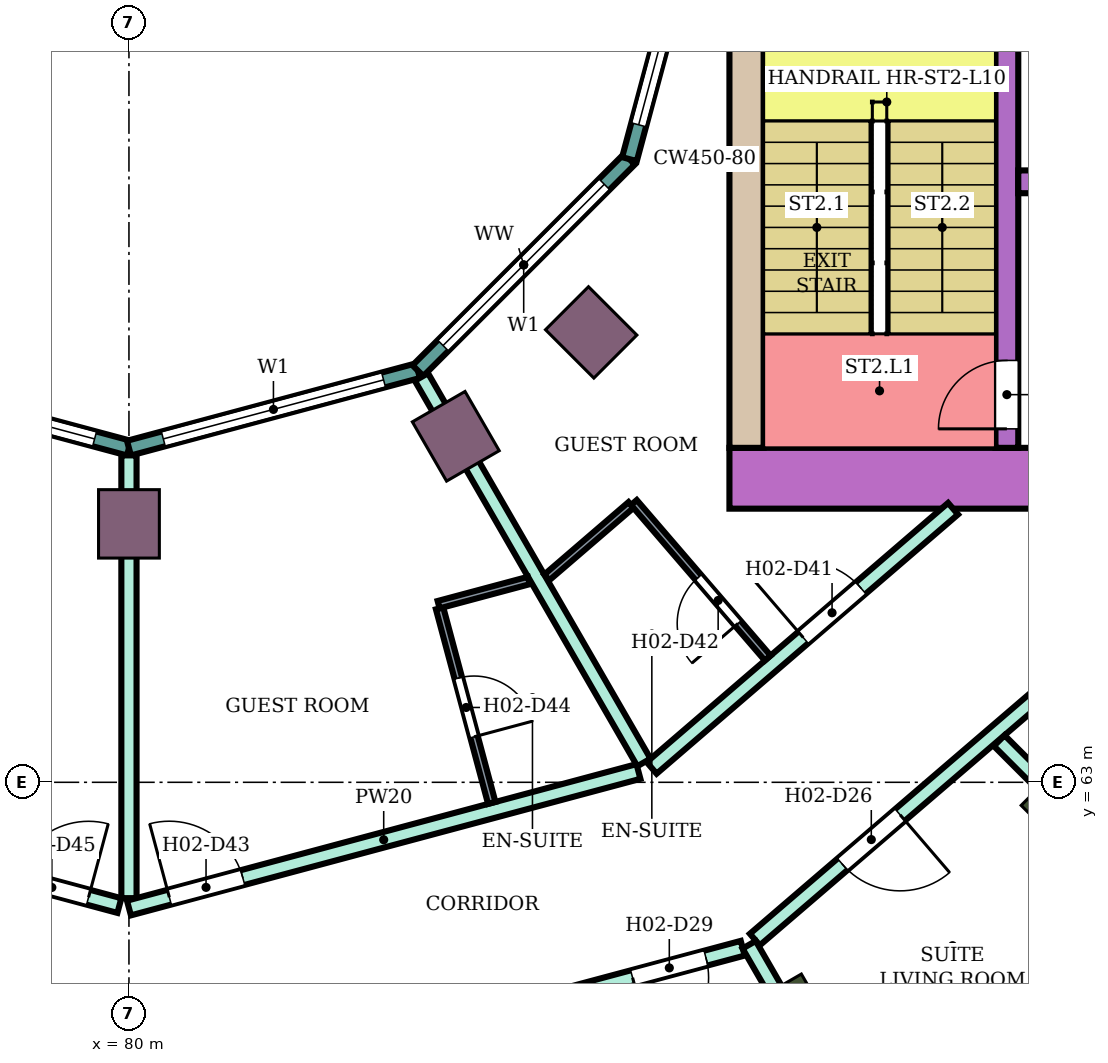
"""IFC4 building model, lengths in metres.
Left out: names, types, materials, properties, quantities, classifications, styles, units other than length and angle.
Written with IfcOpenShell. Run it as: python <this file> out.ifc"""

import sys

from ifc_helpers import new_model, si_unit, direction, frame, frame_2d, origin, origin_2d, place, context, subcontext, project, spatial, rectangle, extrude, element, fill, save


model = new_model("IFC4")
c1 = context("Model", 3, precision=1e-05, world=origin(), true_north=direction((0.0, 1.0)))
c2 = subcontext(c1, "Body", "Model", "MODEL_VIEW")
j1 = project(units=[si_unit("LENGTHUNIT", "METRE"), si_unit("PLANEANGLEUNIT", "RADIAN")], contexts=[c1])
p1 = place(None, origin())
s1 = spatial("IfcSite", under=j1, at=p1, CompositionType="ELEMENT")
p2 = place(p1, origin())
s2 = spatial("IfcBuilding", under=s1, at=p2, CompositionType="ELEMENT")
p3 = place(p2, frame((0.0, 0.0, 47.8)))
s3 = spatial("IfcBuildingStorey", under=s2, at=p3, CompositionType="ELEMENT", Elevation=47.8)
for number, where, z_axis, x_axis in (
    (1, (88.8, 59.758, 0.0), (0.0, 0.0, 1.0), (0.5, -0.866, 0.0)),
    (2, (92.445, 62.555, 0.0), (0.0, 0.0, 1.0), (0.707, -0.707, 0.0)),
):
    element("IfcColumn", number, at=place(p3, frame(where, z_axis=z_axis, x_axis=x_axis)), inside=s3, PredefinedType="COLUMN", context=c2, shape_type="SweptSolid", body=[
        extrude(rectangle(XDim=1.2, YDim=0.8, at=origin_2d()), origin(), (0.0, 0.0, 1.0), 3.8),
    ])
for number, where, z_axis, x_axis in (
    (3, (80.0, 66.4, 0.0), (0.0, 0.0, 1.0), (0.0, -1.0, 0.0)),
    (4, (84.3, 67.552, 0.0), (0.0, 0.0, 1.0), (0.5, -0.866, 0.0)),
    (5, (86.081, 68.919, 0.0), (0.0, 0.0, 1.0), (0.707, -0.707, 0.0)),
):
    element("IfcColumn", number, at=place(p3, frame(where, z_axis=z_axis, x_axis=x_axis)), inside=s3, PredefinedType="COLUMN", context=c2, shape_type="SweptSolid", body=[
        extrude(rectangle(XDim=0.9, YDim=0.8, at=origin_2d()), origin(), (0.0, 0.0, 1.0), 3.8),
    ])
p4 = place(p3, frame((87.9, 67.0, 0.0), z_axis=(0.0, 0.0, 1.0), x_axis=(1.0, 0.0, 0.0)))
e6 = element("IfcWall", 6, at=p4, inside=s3, PredefinedType="SHEAR", context=c2, shape_type="SweptSolid", body=[
    extrude(rectangle(XDim=14.7, YDim=0.8, at=frame_2d((7.35, 0.0))), origin(), (0.0, 0.0, 1.0), 3.48),
])
p5 = place(p4, frame((4.2, 0.0, 0.0)))
e7 = element("IfcOpeningElement", 7, at=p5, cuts=e6, PredefinedType="OPENING", context=c2, shape_type="SweptSolid", body=[
    extrude(rectangle(XDim=2.4, YDim=2.4, at=frame_2d((1.2, 1.2))), frame((0.0, 0.41, 0.0), z_axis=(0.0, -1.0, 0.0), x_axis=(1.0, 0.0, 0.0)), (0.0, 0.0, 1.0), 0.82),
])
p6 = place(p3, frame((88.125, 67.4, 0.0), z_axis=(0.0, 0.0, 1.0), x_axis=(0.0, 1.0, 0.0)))
e8 = element("IfcWall", 8, at=p6, inside=s3, PredefinedType="SHEAR", context=c2, shape_type="SweptSolid", body=[
    extrude(rectangle(XDim=7.6, YDim=0.45, at=frame_2d((3.8, 0.0))), origin(), (0.0, 0.0, 1.0), 3.48),
])
p7 = place(p3, frame((91.55, 67.4, 0.0), z_axis=(0.0, 0.0, 1.0), x_axis=(0.0, 1.0, 0.0)))
e9 = element("IfcWall", 9, at=p7, inside=s3, PredefinedType="SHEAR", context=c2, shape_type="SweptSolid", body=[
    extrude(rectangle(XDim=7.6, YDim=0.3, at=frame_2d((3.8, 0.0))), origin(), (0.0, 0.0, 1.0), 3.48),
])
p8 = place(p7, frame((0.25, 0.0, 0.0)))
e10 = element("IfcOpeningElement", 10, at=p8, cuts=e9, PredefinedType="OPENING", context=c2, shape_type="SweptSolid", body=[
    extrude(rectangle(XDim=0.9, YDim=2.1, at=frame_2d((0.45, 1.05))), frame((0.0, 0.16, 0.0), z_axis=(0.0, -1.0, 0.0), x_axis=(1.0, 0.0, 0.0)), (0.0, 0.0, 1.0), 0.32),
])
p9 = place(p3, frame((91.7, 70.9, 0.0), z_axis=(0.0, 0.0, 1.0), x_axis=(1.0, 0.0, 0.0)))
e11 = element("IfcWall", 11, at=p9, inside=s3, PredefinedType="SHEAR", context=c2, shape_type="SweptSolid", body=[
    extrude(rectangle(XDim=10.9, YDim=0.3, at=frame_2d((5.45, 0.0))), origin(), (0.0, 0.0, 1.0), 3.48),
])
p10 = place(p9, frame((0.4, 0.0, 0.0)))
e12 = element("IfcOpeningElement", 12, at=p10, cuts=e11, PredefinedType="OPENING", context=c2, shape_type="SweptSolid", body=[
    extrude(rectangle(XDim=1.4, YDim=2.1, at=frame_2d((0.7, 1.05))), frame((0.0, 0.16, 0.0), z_axis=(0.0, -1.0, 0.0), x_axis=(1.0, 0.0, 0.0)), (0.0, 0.0, 1.0), 0.32),
])
p11 = place(p9, frame((5.4, 0.0, 0.0)))
e13 = element("IfcOpeningElement", 13, at=p11, cuts=e11, PredefinedType="OPENING", context=c2, shape_type="SweptSolid", body=[
    extrude(rectangle(XDim=1.4, YDim=2.1, at=frame_2d((0.7, 1.05))), frame((0.0, 0.16, 0.0), z_axis=(0.0, -1.0, 0.0), x_axis=(1.0, 0.0, 0.0)), (0.0, 0.0, 1.0), 0.32),
])
p12 = place(p9, frame((8.1, 0.0, 0.0)))
e14 = element("IfcOpeningElement", 14, at=p12, cuts=e11, PredefinedType="OPENING", context=c2, shape_type="SweptSolid", body=[
    extrude(rectangle(XDim=1.0, YDim=2.1, at=frame_2d((0.5, 1.05))), frame((0.0, 0.16, 0.0), z_axis=(0.0, -1.0, 0.0), x_axis=(1.0, 0.0, 0.0)), (0.0, 0.0, 1.0), 0.32),
])
p13 = place(p3, frame((76.198, 68.415, 0.0), z_axis=(0.0, 0.0, 1.0), x_axis=(0.965933654434, -0.258789828301, 0.0)))
e15 = element("IfcWall", 15, at=p13, inside=s3, PredefinedType="NOTDEFINED", context=c2, shape_type="SweptSolid", body=[
    extrude(rectangle(XDim=3.936, YDim=0.2, at=frame_2d((1.968, 0.0))), origin(), (0.0, 0.0, 1.0), 3.8),
])
p14 = place(p13, frame((0.468, 0.0, 0.9)))
e16 = element("IfcOpeningElement", 16, at=p14, cuts=e15, PredefinedType="OPENING", context=c2, shape_type="SweptSolid", body=[
    extrude(rectangle(XDim=3.0, YDim=2.3, at=frame_2d((1.5, 1.15))), frame((0.0, 0.11, 0.0), z_axis=(0.0, -1.0, 0.0), x_axis=(1.0, 0.0, 0.0)), (0.0, 0.0, 1.0), 0.22),
])
p15 = place(p3, frame((80.0, 67.396, 0.0), z_axis=(0.0, 0.0, 1.0), x_axis=(0.965933654434, 0.258789828301, 0.0)))
e17 = element("IfcWall", 17, at=p15, inside=s3, PredefinedType="NOTDEFINED", context=c2, shape_type="SweptSolid", body=[
    extrude(rectangle(XDim=3.936, YDim=0.2, at=frame_2d((1.968, 0.0))), origin(), (0.0, 0.0, 1.0), 3.8),
])
p16 = place(p15, frame((0.468, 0.0, 0.9)))
e18 = element("IfcOpeningElement", 18, at=p16, cuts=e17, PredefinedType="OPENING", context=c2, shape_type="SweptSolid", body=[
    extrude(rectangle(XDim=3.0, YDim=2.3, at=frame_2d((1.5, 1.15))), frame((0.0, 0.11, 0.0), z_axis=(0.0, -1.0, 0.0), x_axis=(1.0, 0.0, 0.0)), (0.0, 0.0, 1.0), 0.22),
])
p17 = place(p3, frame((83.802, 68.415, 0.0), z_axis=(0.0, 0.0, 1.0), x_axis=(0.707106781187, 0.707106781187, 0.0)))
e19 = element("IfcWall", 19, at=p17, inside=s3, PredefinedType="NOTDEFINED", context=c2, shape_type="SweptSolid", body=[
    extrude(rectangle(XDim=3.936, YDim=0.2, at=frame_2d((1.968, 0.0))), origin(), (0.0, 0.0, 1.0), 3.8),
])
p18 = place(p17, frame((0.468, 0.0, 0.9)))
e20 = element("IfcOpeningElement", 20, at=p18, cuts=e19, PredefinedType="OPENING", context=c2, shape_type="SweptSolid", body=[
    extrude(rectangle(XDim=3.0, YDim=2.3, at=frame_2d((1.5, 1.15))), frame((0.0, 0.11, 0.0), z_axis=(0.0, -1.0, 0.0), x_axis=(1.0, 0.0, 0.0)), (0.0, 0.0, 1.0), 0.22),
])
p19 = place(p3, frame((86.585, 71.198, 0.0), z_axis=(0.0, 0.0, 1.0), x_axis=(0.258789828301, 0.965933654434, 0.0)))
e21 = element("IfcWall", 21, at=p19, inside=s3, PredefinedType="NOTDEFINED", context=c2, shape_type="SweptSolid", body=[
    extrude(rectangle(XDim=3.936, YDim=0.2, at=frame_2d((1.968, 0.0))), origin(), (0.0, 0.0, 1.0), 3.8),
])
p20 = place(p19, frame((0.468, 0.0, 0.9)))
e22 = element("IfcOpeningElement", 22, at=p20, cuts=e21, PredefinedType="OPENING", context=c2, shape_type="SweptSolid", body=[
    extrude(rectangle(XDim=3.0, YDim=2.3, at=frame_2d((1.5, 1.15))), frame((0.0, 0.11, 0.0), z_axis=(0.0, -1.0, 0.0), x_axis=(1.0, 0.0, 0.0)), (0.0, 0.0, 1.0), 0.22),
])
p21 = place(p3, frame((71.877, 60.832, 0.0), z_axis=(0.0, 0.0, 1.0), x_axis=(0.965852509869, -0.259092510851, 0.0)))
e23 = element("IfcWall", 23, at=p21, inside=s3, PredefinedType="PARTITIONING", context=c2, shape_type="SweptSolid", body=[
    extrude(rectangle(XDim=8.32, YDim=0.2, at=frame_2d((4.16, 0.0))), origin(), (0.0, 0.0, 1.0), 3.35),
])
p22 = place(p21, frame((6.86, 0.0, 0.0)))
e24 = element("IfcOpeningElement", 24, at=p22, cuts=e23, PredefinedType="OPENING", context=c2, shape_type="SweptSolid", body=[
    extrude(rectangle(XDim=1.0, YDim=2.1, at=frame_2d((0.5, 1.05))), frame((0.0, 0.11, 0.0), z_axis=(0.0, -1.0, 0.0), x_axis=(1.0, 0.0, 0.0)), (0.0, 0.0, 1.0), 0.22),
])
p23 = place(p21, frame((0.55, 0.0, 0.0)))
e25 = element("IfcOpeningElement", 25, at=p23, cuts=e23, PredefinedType="OPENING", context=c2, shape_type="SweptSolid", body=[
    extrude(rectangle(XDim=1.0, YDim=2.1, at=frame_2d((0.5, 1.05))), frame((0.0, 0.11, 0.0), z_axis=(0.0, -1.0, 0.0), x_axis=(1.0, 0.0, 0.0)), (0.0, 0.0, 1.0), 0.22),
])
p24 = place(p3, frame((73.287, 63.145, 0.0), z_axis=(0.0, 0.0, 1.0), x_axis=(0.965854200194, -0.259086209526, 0.0)))
e26 = element("IfcWall", 26, at=p24, inside=s3, PredefinedType="PARTITIONING", context=c2, shape_type="SweptSolid", body=[
    extrude(rectangle(XDim=6.82, YDim=0.2, at=frame_2d((3.41, 0.0))), origin(), (0.0, 0.0, 1.0), 3.35),
])
p25 = place(p24, frame((5.4, 0.0, 0.0)))
e27 = element("IfcOpeningElement", 27, at=p25, cuts=e26, PredefinedType="OPENING", context=c2, shape_type="SweptSolid", body=[
    extrude(rectangle(XDim=1.0, YDim=2.1, at=frame_2d((0.5, 1.05))), frame((0.0, 0.11, 0.0), z_axis=(0.0, -1.0, 0.0), x_axis=(1.0, 0.0, 0.0)), (0.0, 0.0, 1.0), 0.22),
])
p26 = place(p3, frame((80.0, 58.655, 0.0), z_axis=(0.0, 0.0, 1.0), x_axis=(0.965967338894, 0.258664068224, 0.0)))
e28 = element("IfcWall", 28, at=p26, inside=s3, PredefinedType="PARTITIONING", context=c2, shape_type="SweptSolid", body=[
    extrude(rectangle(XDim=8.36, YDim=0.2, at=frame_2d((4.18, 0.0))), origin(), (0.0, 0.0, 1.0), 3.35),
])
p27 = place(p26, frame((6.86, 0.0, 0.0)))
e29 = element("IfcOpeningElement", 29, at=p27, cuts=e28, PredefinedType="OPENING", context=c2, shape_type="SweptSolid", body=[
    extrude(rectangle(XDim=1.0, YDim=2.1, at=frame_2d((0.5, 1.05))), frame((0.0, 0.11, 0.0), z_axis=(0.0, -1.0, 0.0), x_axis=(1.0, 0.0, 0.0)), (0.0, 0.0, 1.0), 0.22),
])
p28 = place(p26, frame((1.675, 0.0, 0.0)))
e30 = element("IfcOpeningElement", 30, at=p28, cuts=e28, PredefinedType="OPENING", context=c2, shape_type="SweptSolid", body=[
    extrude(rectangle(XDim=0.9, YDim=2.1, at=frame_2d((0.45, 1.05))), frame((0.0, 0.11, 0.0), z_axis=(0.0, -1.0, 0.0), x_axis=(1.0, 0.0, 0.0)), (0.0, 0.0, 1.0), 0.22),
])
p29 = place(p3, frame((80.0, 61.476, 0.0), z_axis=(0.0, 0.0, 1.0), x_axis=(0.0, 1.0, 0.0)))
e31 = element("IfcWall", 31, at=p29, inside=s3, PredefinedType="PARTITIONING", context=c2, shape_type="SweptSolid", body=[
    extrude(rectangle(XDim=5.825, YDim=0.2, at=frame_2d((2.913, 0.0))), origin(), (0.0, 0.0, 1.0), 3.35),
])
p30 = place(p3, frame((80.0, 61.346, 0.0), z_axis=(0.0, 0.0, 1.0), x_axis=(0.965924181808, 0.258825182312, 0.0)))
e32 = element("IfcWall", 32, at=p30, inside=s3, PredefinedType="PARTITIONING", context=c2, shape_type="SweptSolid", body=[
    extrude(rectangle(XDim=6.94, YDim=0.2, at=frame_2d((3.47, 0.0))), origin(), (0.0, 0.0, 1.0), 3.35),
])
p31 = place(p30, frame((0.55, 0.0, 0.0)))
e33 = element("IfcOpeningElement", 33, at=p31, cuts=e32, PredefinedType="OPENING", context=c2, shape_type="SweptSolid", body=[
    extrude(rectangle(XDim=1.0, YDim=2.1, at=frame_2d((0.5, 1.05))), frame((0.0, 0.11, 0.0), z_axis=(0.0, -1.0, 0.0), x_axis=(1.0, 0.0, 0.0)), (0.0, 0.0, 1.0), 0.22),
])
p32 = place(p3, frame((83.848, 68.332, 0.0), z_axis=(0.0, 0.0, 1.0), x_axis=(0.499919778085, -0.866071714975, 0.0)))
e34 = element("IfcWall", 34, at=p32, inside=s3, PredefinedType="PARTITIONING", context=c2, shape_type="SweptSolid", body=[
    extrude(rectangle(XDim=5.855, YDim=0.2, at=frame_2d((2.927, 0.0))), origin(), (0.0, 0.0, 1.0), 3.35),
])
p33 = place(p3, frame((86.877, 63.189, 0.0), z_axis=(0.0, 0.0, 1.0), x_axis=(0.758164888471, 0.652062881853, 0.0)))
e35 = element("IfcWall", 35, at=p33, inside=s3, PredefinedType="PARTITIONING", context=c2, shape_type="SweptSolid", body=[
    extrude(rectangle(XDim=5.23, YDim=0.2, at=frame_2d((2.615, 0.0))), origin(), (0.0, 0.0, 1.0), 3.35),
])
p34 = place(p33, frame((2.63, 0.0, 0.0)))
e36 = element("IfcOpeningElement", 36, at=p34, cuts=e35, PredefinedType="OPENING", context=c2, shape_type="SweptSolid", body=[
    extrude(rectangle(XDim=1.0, YDim=2.1, at=frame_2d((0.5, 1.05))), frame((0.0, 0.11, 0.0), z_axis=(0.0, -1.0, 0.0), x_axis=(1.0, 0.0, 0.0)), (0.0, 0.0, 1.0), 0.22),
])
p35 = place(p3, frame((88.235, 60.931, 0.0), z_axis=(0.0, 0.0, 1.0), x_axis=(0.758799498714, 0.651324282329, 0.0)))
e37 = element("IfcWall", 37, at=p35, inside=s3, PredefinedType="PARTITIONING", context=c2, shape_type="SweptSolid", body=[
    extrude(rectangle(XDim=6.186, YDim=0.2, at=frame_2d((3.093, 0.0))), origin(), (0.0, 0.0, 1.0), 3.35),
])
p36 = place(p35, frame((1.519, 0.0, 0.0)))
e38 = element("IfcOpeningElement", 38, at=p36, cuts=e37, PredefinedType="OPENING", context=c2, shape_type="SweptSolid", body=[
    extrude(rectangle(XDim=1.0, YDim=2.1, at=frame_2d((0.5, 1.05))), frame((0.0, 0.11, 0.0), z_axis=(0.0, -1.0, 0.0), x_axis=(1.0, 0.0, 0.0)), (0.0, 0.0, 1.0), 0.22),
])
p37 = place(p3, frame((88.159, 60.863, 0.0), z_axis=(0.0, 0.0, 1.0), x_axis=(0.499897184548, -0.866084756177, 0.0)))
e39 = element("IfcWall", 39, at=p37, inside=s3, PredefinedType="PARTITIONING", context=c2, shape_type="SweptSolid", body=[
    extrude(rectangle(XDim=9.475, YDim=0.2, at=frame_2d((4.737, 0.0))), origin(), (0.0, 0.0, 1.0), 3.35),
])
p38 = place(p3, frame((91.449, 63.548, 0.0), z_axis=(0.0, 0.0, 1.0), x_axis=(0.706984810649, -0.707228730688, 0.0)))
e40 = element("IfcWall", 40, at=p38, inside=s3, PredefinedType="PARTITIONING", context=c2, shape_type="SweptSolid", body=[
    extrude(rectangle(XDim=7.006, YDim=0.2, at=frame_2d((3.503, 0.0))), origin(), (0.0, 0.0, 1.0), 3.35),
])
p39 = place(p3, frame((84.087, 65.289, 0.0), z_axis=(0.0, 0.0, 1.0), x_axis=(0.258929459649, -0.965896234037, 0.0)))
e41 = element("IfcWall", 41, at=p39, inside=s3, PredefinedType="PARTITIONING", context=c2, shape_type="SweptSolid", body=[
    extrude(rectangle(XDim=2.65, YDim=0.1, at=frame_2d((1.325, 0.0))), origin(), (0.0, 0.0, 1.0), 3.35),
])
p40 = place(p39, frame((0.95, 0.0, 0.0)))
e42 = element("IfcOpeningElement", 42, at=p40, cuts=e41, PredefinedType="OPENING", context=c2, shape_type="SweptSolid", body=[
    extrude(rectangle(XDim=0.8, YDim=2.1, at=frame_2d((0.4, 1.05))), frame((0.0, 0.06, 0.0), z_axis=(0.0, -1.0, 0.0), x_axis=(1.0, 0.0, 0.0)), (0.0, 0.0, 1.0), 0.12),
])
p41 = place(p3, frame((84.074, 65.337, 0.0), z_axis=(0.0, 0.0, 1.0), x_axis=(0.965914351064, 0.258861867428, 0.0)))
e43 = element("IfcWall", 43, at=p41, inside=s3, PredefinedType="PARTITIONING", context=c2, shape_type="SweptSolid", body=[
    extrude(rectangle(XDim=1.229, YDim=0.1, at=frame_2d((0.615, 0.0))), origin(), (0.0, 0.0, 1.0), 3.35),
])
p42 = place(p3, frame((85.497, 65.696, 0.0), z_axis=(0.0, 0.0, 1.0), x_axis=(0.75817032582, 0.652056559698, 0.0)))
e44 = element("IfcWall", 44, at=p42, inside=s3, PredefinedType="PARTITIONING", context=c2, shape_type="SweptSolid", body=[
    extrude(rectangle(XDim=1.461, YDim=0.1, at=frame_2d((0.73, 0.0))), origin(), (0.0, 0.0, 1.0), 3.35),
])
p43 = place(p3, frame((86.643, 66.681, 0.0), z_axis=(0.0, 0.0, 1.0), x_axis=(0.652264876065, -0.757991115682, 0.0)))
e45 = element("IfcWall", 45, at=p43, inside=s3, PredefinedType="PARTITIONING", context=c2, shape_type="SweptSolid", body=[
    extrude(rectangle(XDim=2.699, YDim=0.1, at=frame_2d((1.35, 0.0))), origin(), (0.0, 0.0, 1.0), 3.35),
])
p44 = place(p43, frame((1.3, 0.0, 0.0)))
e46 = element("IfcOpeningElement", 46, at=p44, cuts=e45, PredefinedType="OPENING", context=c2, shape_type="SweptSolid", body=[
    extrude(rectangle(XDim=0.8, YDim=2.1, at=frame_2d((0.4, 1.05))), frame((0.0, 0.06, 0.0), z_axis=(0.0, -1.0, 0.0), x_axis=(1.0, 0.0, 0.0)), (0.0, 0.0, 1.0), 0.12),
])
p45 = place(p3, frame((89.974, 57.94, 0.0), z_axis=(0.0, 0.0, 1.0), x_axis=(0.75821417454, 0.652005571699, 0.0)))
e47 = element("IfcWall", 47, at=p45, inside=s3, PredefinedType="PARTITIONING", context=c2, shape_type="SweptSolid", body=[
    extrude(rectangle(XDim=4.915, YDim=0.1, at=frame_2d((2.457, 0.0))), origin(), (0.0, 0.0, 1.0), 3.35),
])
p46 = place(p45, frame((1.017, 0.0, 0.0)))
e48 = element("IfcOpeningElement", 48, at=p46, cuts=e47, PredefinedType="OPENING", context=c2, shape_type="SweptSolid", body=[
    extrude(rectangle(XDim=0.9, YDim=2.1, at=frame_2d((0.45, 1.05))), frame((0.0, 0.06, 0.0), z_axis=(0.0, -1.0, 0.0), x_axis=(1.0, 0.0, 0.0)), (0.0, 0.0, 1.0), 0.12),
])
p47 = place(p14, origin())
e49 = element("IfcWindow", 49, at=p47, inside=s3, PartitioningType="SINGLE_PANEL", PredefinedType="WINDOW", context=c2, shape_type="SweptSolid", body=[
    extrude(rectangle(XDim=3.0, YDim=2.3, at=frame_2d((1.5, 1.15))), frame((0.0, 0.03, 0.0), z_axis=(0.0, -1.0, 0.0), x_axis=(1.0, 0.0, 0.0)), (0.0, 0.0, 1.0), 0.06),
])
fill(e16, e49)
p48 = place(p16, origin())
e50 = element("IfcWindow", 50, at=p48, inside=s3, PartitioningType="SINGLE_PANEL", PredefinedType="WINDOW", context=c2, shape_type="SweptSolid", body=[
    extrude(rectangle(XDim=3.0, YDim=2.3, at=frame_2d((1.5, 1.15))), frame((0.0, 0.03, 0.0), z_axis=(0.0, -1.0, 0.0), x_axis=(1.0, 0.0, 0.0)), (0.0, 0.0, 1.0), 0.06),
])
fill(e18, e50)
p49 = place(p18, origin())
e51 = element("IfcWindow", 51, at=p49, inside=s3, PartitioningType="SINGLE_PANEL", PredefinedType="WINDOW", context=c2, shape_type="SweptSolid", body=[
    extrude(rectangle(XDim=3.0, YDim=2.3, at=frame_2d((1.5, 1.15))), frame((0.0, 0.03, 0.0), z_axis=(0.0, -1.0, 0.0), x_axis=(1.0, 0.0, 0.0)), (0.0, 0.0, 1.0), 0.06),
])
fill(e20, e51)
p50 = place(p20, origin())
e52 = element("IfcWindow", 52, at=p50, inside=s3, PartitioningType="SINGLE_PANEL", PredefinedType="WINDOW", context=c2, shape_type="SweptSolid", body=[
    extrude(rectangle(XDim=3.0, YDim=2.3, at=frame_2d((1.5, 1.15))), frame((0.0, 0.03, 0.0), z_axis=(0.0, -1.0, 0.0), x_axis=(1.0, 0.0, 0.0)), (0.0, 0.0, 1.0), 0.06),
])
fill(e22, e52)
p51 = place(p36, frame((1.0, 0.0, 0.0), z_axis=(0.0, 0.0, 1.0), x_axis=(-1.0, 0.0, 0.0)))
e53 = element("IfcDoor", 53, at=p51, inside=s3, OperationType="SINGLE_SWING_LEFT", PredefinedType="DOOR", context=c2, shape_type="SweptSolid", body=[
    extrude(rectangle(XDim=1.0, YDim=2.1, at=frame_2d((0.5, 1.05))), frame((0.0, 0.025, 0.0), z_axis=(0.0, -1.0, 0.0), x_axis=(1.0, 0.0, 0.0)), (0.0, 0.0, 1.0), 0.05),
])
fill(e38, e53)
p52 = place(p27, frame((1.0, 0.0, 0.0), z_axis=(0.0, 0.0, 1.0), x_axis=(-1.0, 0.0, 0.0)))
e54 = element("IfcDoor", 54, at=p52, inside=s3, OperationType="SINGLE_SWING_RIGHT", PredefinedType="DOOR", context=c2, shape_type="SweptSolid", body=[
    extrude(rectangle(XDim=1.0, YDim=2.1, at=frame_2d((0.5, 1.05))), frame((0.0, 0.025, 0.0), z_axis=(0.0, -1.0, 0.0), x_axis=(1.0, 0.0, 0.0)), (0.0, 0.0, 1.0), 0.05),
])
fill(e29, e54)
p53 = place(p34, origin())
e55 = element("IfcDoor", 55, at=p53, inside=s3, OperationType="SINGLE_SWING_LEFT", PredefinedType="DOOR", context=c2, shape_type="SweptSolid", body=[
    extrude(rectangle(XDim=1.0, YDim=2.1, at=frame_2d((0.5, 1.05))), frame((0.0, 0.025, 0.0), z_axis=(0.0, -1.0, 0.0), x_axis=(1.0, 0.0, 0.0)), (0.0, 0.0, 1.0), 0.05),
])
fill(e36, e55)
p54 = place(p44, frame((0.8, 0.0, 0.0), z_axis=(0.0, 0.0, 1.0), x_axis=(-1.0, 0.0, 0.0)))
e56 = element("IfcDoor", 56, at=p54, inside=s3, OperationType="SINGLE_SWING_LEFT", PredefinedType="DOOR", context=c2, shape_type="SweptSolid", body=[
    extrude(rectangle(XDim=0.8, YDim=2.1, at=frame_2d((0.4, 1.05))), frame((0.0, 0.025, 0.0), z_axis=(0.0, -1.0, 0.0), x_axis=(1.0, 0.0, 0.0)), (0.0, 0.0, 1.0), 0.05),
])
fill(e46, e56)
p55 = place(p31, origin())
e57 = element("IfcDoor", 57, at=p55, inside=s3, OperationType="SINGLE_SWING_LEFT", PredefinedType="DOOR", context=c2, shape_type="SweptSolid", body=[
    extrude(rectangle(XDim=1.0, YDim=2.1, at=frame_2d((0.5, 1.05))), frame((0.0, 0.025, 0.0), z_axis=(0.0, -1.0, 0.0), x_axis=(1.0, 0.0, 0.0)), (0.0, 0.0, 1.0), 0.05),
])
fill(e33, e57)
p56 = place(p40, origin())
e58 = element("IfcDoor", 58, at=p56, inside=s3, OperationType="SINGLE_SWING_RIGHT", PredefinedType="DOOR", context=c2, shape_type="SweptSolid", body=[
    extrude(rectangle(XDim=0.8, YDim=2.1, at=frame_2d((0.4, 1.05))), frame((0.0, 0.025, 0.0), z_axis=(0.0, -1.0, 0.0), x_axis=(1.0, 0.0, 0.0)), (0.0, 0.0, 1.0), 0.05),
])
fill(e42, e58)
p57 = place(p25, origin())
e59 = element("IfcDoor", 59, at=p57, inside=s3, OperationType="SINGLE_SWING_RIGHT", PredefinedType="DOOR", context=c2, shape_type="SweptSolid", body=[
    extrude(rectangle(XDim=1.0, YDim=2.1, at=frame_2d((0.5, 1.05))), frame((0.0, 0.025, 0.0), z_axis=(0.0, -1.0, 0.0), x_axis=(1.0, 0.0, 0.0)), (0.0, 0.0, 1.0), 0.05),
])
fill(e27, e59)
p58 = place(p8, origin())
e60 = element("IfcDoor", 60, at=p58, inside=s3, OperationType="SINGLE_SWING_LEFT", PredefinedType="DOOR", context=c2, shape_type="SweptSolid", body=[
    extrude(rectangle(XDim=0.9, YDim=2.1, at=frame_2d((0.45, 1.05))), frame((0.0, 0.025, 0.0), z_axis=(0.0, -1.0, 0.0), x_axis=(1.0, 0.0, 0.0)), (0.0, 0.0, 1.0), 0.05),
])
fill(e10, e60)
save(model, sys.argv[1])
